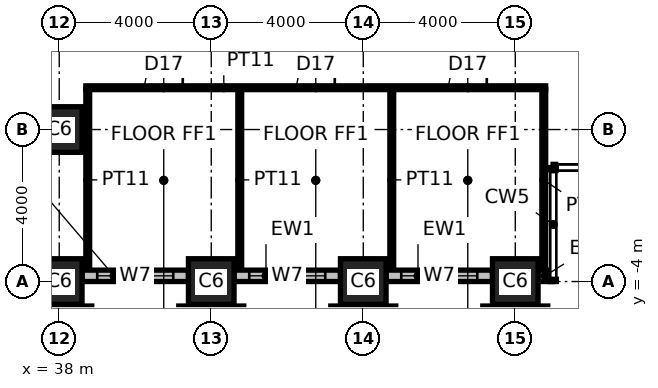
"""IFC4 building model, lengths in metres.
Left out: names, types, materials, properties, quantities, classifications, styles, units other than length and angle.
Written with IfcOpenShell. Run it as: python <this file> out.ifc"""

import sys

from ifc_helpers import new_model, si_unit, direction, frame, frame_2d, origin, origin_2d, place, context, subcontext, project, spatial, rectangle, hollow_rectangle, extrude, element, fill, save


model = new_model("IFC4")
c1 = context("Model", 3, precision=1e-05, world=origin(), true_north=direction((0.0, 1.0)))
c2 = subcontext(c1, "Body", "Model", "MODEL_VIEW")
j1 = project(units=[si_unit("LENGTHUNIT", "METRE"), si_unit("PLANEANGLEUNIT", "RADIAN")], contexts=[c1])
p1 = place(None, origin())
s1 = spatial("IfcSite", under=j1, at=p1, CompositionType="ELEMENT")
p2 = place(p1, origin())
s2 = spatial("IfcBuilding", under=s1, at=p2, CompositionType="ELEMENT")
p3 = place(p2, frame((0.0, 0.0, 39.0)))
s3 = spatial("IfcBuildingStorey", under=s2, at=p3, CompositionType="ELEMENT", Elevation=39.0)
for number, where, z_axis, x_axis in (
    (1, (38.0, -4.0, 0.0), (0.0, 0.0, 1.0), (1.0, 0.0, 0.0)),
    (2, (42.0, -4.0, 0.0), (0.0, 0.0, 1.0), (1.0, 0.0, 0.0)),
    (3, (46.0, -4.0, 0.0), (0.0, 0.0, 1.0), (1.0, 0.0, 0.0)),
    (4, (50.0, -4.0, 0.0), (0.0, 0.0, 1.0), (1.0, 0.0, 0.0)),
    (5, (38.0, 0.0, 0.0), (0.0, 0.0, 1.0), (1.0, 0.0, 0.0)),
):
    element("IfcColumn", number, at=place(p3, frame(where, z_axis=z_axis, x_axis=x_axis)), inside=s3, PredefinedType="COLUMN", context=c2, shape_type="SweptSolid", body=[
        extrude(hollow_rectangle(XDim=1.2, YDim=1.2, WallThickness=0.125, at=origin_2d()), origin(), (0.0, 0.0, 1.0), 4.0),
    ])
p4 = place(p3, frame((38.7, 1.1, 0.0), z_axis=(0.0, 0.0, 1.0), x_axis=(1.0, 0.0, 0.0)))
e6 = element("IfcWall", 6, at=p4, inside=s3, PredefinedType="PARTITIONING", context=c2, shape_type="SweptSolid", body=[
    extrude(rectangle(XDim=12.1, YDim=0.1, at=frame_2d((6.05, 0.0))), origin(), (0.0, 0.0, 1.0), 3.85),
])
p5 = place(p4, frame((1.55, 0.0, 0.0)))
e7 = element("IfcOpeningElement", 7, at=p5, cuts=e6, PredefinedType="OPENING", context=c2, shape_type="SweptSolid", body=[
    extrude(rectangle(XDim=1.0, YDim=2.2, at=frame_2d((0.5, 1.1))), frame((0.0, 0.06, 0.0), z_axis=(0.0, -1.0, 0.0), x_axis=(1.0, 0.0, 0.0)), (0.0, 0.0, 1.0), 0.12),
])
p6 = place(p4, frame((5.55, 0.0, 0.0)))
e8 = element("IfcOpeningElement", 8, at=p6, cuts=e6, PredefinedType="OPENING", context=c2, shape_type="SweptSolid", body=[
    extrude(rectangle(XDim=1.0, YDim=2.2, at=frame_2d((0.5, 1.1))), frame((0.0, 0.06, 0.0), z_axis=(0.0, -1.0, 0.0), x_axis=(1.0, 0.0, 0.0)), (0.0, 0.0, 1.0), 0.12),
])
p7 = place(p4, frame((9.55, 0.0, 0.0)))
e9 = element("IfcOpeningElement", 9, at=p7, cuts=e6, PredefinedType="OPENING", context=c2, shape_type="SweptSolid", body=[
    extrude(rectangle(XDim=1.0, YDim=2.2, at=frame_2d((0.5, 1.1))), frame((0.0, 0.06, 0.0), z_axis=(0.0, -1.0, 0.0), x_axis=(1.0, 0.0, 0.0)), (0.0, 0.0, 1.0), 0.12),
])
for number, where, z_axis, x_axis in (
    (10, (38.75, -3.7, 0.0), (0.0, 0.0, 1.0), (0.0, 1.0, 0.0)),
    (11, (42.75, -3.7, 0.0), (0.0, 0.0, 1.0), (0.0, 1.0, 0.0)),
    (12, (46.75, -3.7, 0.0), (0.0, 0.0, 1.0), (0.0, 1.0, 0.0)),
    (13, (50.75, -3.7, 0.0), (0.0, 0.0, 1.0), (0.0, 1.0, 0.0)),
):
    element("IfcWall", number, at=place(p3, frame(where, z_axis=z_axis, x_axis=x_axis)), inside=s3, PredefinedType="PARTITIONING", context=c2, shape_type="SweptSolid", body=[
        extrude(rectangle(XDim=4.75, YDim=0.1, at=frame_2d((2.375, 0.0))), origin(), (0.0, 0.0, 1.0), 3.85),
    ])
p8 = place(p3, frame((38.6, -3.85, 0.0), z_axis=(0.0, 0.0, 1.0), x_axis=(1.0, 0.0, 0.0)))
e14 = element("IfcWall", 14, at=p8, inside=s3, PredefinedType="ELEMENTEDWALL", context=c2, shape_type="SweptSolid", body=[
    extrude(rectangle(XDim=2.8, YDim=0.3, at=frame_2d((1.4, 0.0))), origin(), (0.0, 0.0, 1.0), 2.65),
])
p9 = place(p8, frame((0.4, 0.0, 0.8)))
e15 = element("IfcOpeningElement", 15, at=p9, cuts=e14, PredefinedType="OPENING", context=c2, shape_type="SweptSolid", body=[
    extrude(rectangle(XDim=2.0, YDim=1.8, at=frame_2d((1.0, 0.9))), frame((0.0, 0.16, 0.0), z_axis=(0.0, -1.0, 0.0), x_axis=(1.0, 0.0, 0.0)), (0.0, 0.0, 1.0), 0.32),
])
p10 = place(p3, frame((42.6, -3.85, 0.0), z_axis=(0.0, 0.0, 1.0), x_axis=(1.0, 0.0, 0.0)))
e16 = element("IfcWall", 16, at=p10, inside=s3, PredefinedType="ELEMENTEDWALL", context=c2, shape_type="SweptSolid", body=[
    extrude(rectangle(XDim=2.8, YDim=0.3, at=frame_2d((1.4, 0.0))), origin(), (0.0, 0.0, 1.0), 2.65),
])
p11 = place(p10, frame((0.4, 0.0, 0.8)))
e17 = element("IfcOpeningElement", 17, at=p11, cuts=e16, PredefinedType="OPENING", context=c2, shape_type="SweptSolid", body=[
    extrude(rectangle(XDim=2.0, YDim=1.8, at=frame_2d((1.0, 0.9))), frame((0.0, 0.16, 0.0), z_axis=(0.0, -1.0, 0.0), x_axis=(1.0, 0.0, 0.0)), (0.0, 0.0, 1.0), 0.32),
])
p12 = place(p3, frame((46.6, -3.85, 0.0), z_axis=(0.0, 0.0, 1.0), x_axis=(1.0, 0.0, 0.0)))
e18 = element("IfcWall", 18, at=p12, inside=s3, PredefinedType="ELEMENTEDWALL", context=c2, shape_type="SweptSolid", body=[
    extrude(rectangle(XDim=2.8, YDim=0.3, at=frame_2d((1.4, 0.0))), origin(), (0.0, 0.0, 1.0), 2.65),
])
p13 = place(p12, frame((0.4, 0.0, 0.8)))
e19 = element("IfcOpeningElement", 19, at=p13, cuts=e18, PredefinedType="OPENING", context=c2, shape_type="SweptSolid", body=[
    extrude(rectangle(XDim=2.0, YDim=1.8, at=frame_2d((1.0, 0.9))), frame((0.0, 0.16, 0.0), z_axis=(0.0, -1.0, 0.0), x_axis=(1.0, 0.0, 0.0)), (0.0, 0.0, 1.0), 0.32),
])
p14 = place(p3, frame((50.6, -3.85, 0.0), z_axis=(0.0, 0.0, 1.0), x_axis=(1.0, 0.0, 0.0)))
e20 = element("IfcWall", 20, at=p14, inside=s3, PredefinedType="ELEMENTEDWALL", context=c2, shape_type="SweptSolid", body=[
    extrude(rectangle(XDim=0.37, YDim=0.3, at=frame_2d((0.185, 0.0))), origin(), (0.0, 0.0, 1.0), 2.65),
])
p15 = place(p5, origin())
e21 = element("IfcDoor", 21, at=p15, inside=s3, OperationType="SINGLE_SWING_RIGHT", PredefinedType="DOOR", context=c2, shape_type="SweptSolid", body=[
    extrude(rectangle(XDim=1.0, YDim=2.2, at=frame_2d((0.5, 1.1))), frame((0.0, 0.025, 0.0), z_axis=(0.0, -1.0, 0.0), x_axis=(1.0, 0.0, 0.0)), (0.0, 0.0, 1.0), 0.05),
])
fill(e7, e21)
p16 = place(p6, origin())
e22 = element("IfcDoor", 22, at=p16, inside=s3, OperationType="SINGLE_SWING_RIGHT", PredefinedType="DOOR", context=c2, shape_type="SweptSolid", body=[
    extrude(rectangle(XDim=1.0, YDim=2.2, at=frame_2d((0.5, 1.1))), frame((0.0, 0.025, 0.0), z_axis=(0.0, -1.0, 0.0), x_axis=(1.0, 0.0, 0.0)), (0.0, 0.0, 1.0), 0.05),
])
fill(e8, e22)
p17 = place(p7, origin())
e23 = element("IfcDoor", 23, at=p17, inside=s3, OperationType="SINGLE_SWING_RIGHT", PredefinedType="DOOR", context=c2, shape_type="SweptSolid", body=[
    extrude(rectangle(XDim=1.0, YDim=2.2, at=frame_2d((0.5, 1.1))), frame((0.0, 0.025, 0.0), z_axis=(0.0, -1.0, 0.0), x_axis=(1.0, 0.0, 0.0)), (0.0, 0.0, 1.0), 0.05),
])
fill(e9, e23)
p18 = place(p9, origin())
e24 = element("IfcWindow", 24, at=p18, inside=s3, PartitioningType="SINGLE_PANEL", PredefinedType="WINDOW", context=c2, shape_type="SweptSolid", body=[
    extrude(rectangle(XDim=2.0, YDim=1.8, at=frame_2d((1.0, 0.9))), frame((0.0, 0.03, 0.0), z_axis=(0.0, -1.0, 0.0), x_axis=(1.0, 0.0, 0.0)), (0.0, 0.0, 1.0), 0.06),
])
fill(e15, e24)
p19 = place(p11, origin())
e25 = element("IfcWindow", 25, at=p19, inside=s3, PartitioningType="SINGLE_PANEL", PredefinedType="WINDOW", context=c2, shape_type="SweptSolid", body=[
    extrude(rectangle(XDim=2.0, YDim=1.8, at=frame_2d((1.0, 0.9))), frame((0.0, 0.03, 0.0), z_axis=(0.0, -1.0, 0.0), x_axis=(1.0, 0.0, 0.0)), (0.0, 0.0, 1.0), 0.06),
])
fill(e17, e25)
p20 = place(p13, origin())
e26 = element("IfcWindow", 26, at=p20, inside=s3, PartitioningType="SINGLE_PANEL", PredefinedType="WINDOW", context=c2, shape_type="SweptSolid", body=[
    extrude(rectangle(XDim=2.0, YDim=1.8, at=frame_2d((1.0, 0.9))), frame((0.0, 0.03, 0.0), z_axis=(0.0, -1.0, 0.0), x_axis=(1.0, 0.0, 0.0)), (0.0, 0.0, 1.0), 0.06),
])
fill(e19, e26)
save(model, sys.argv[1])
